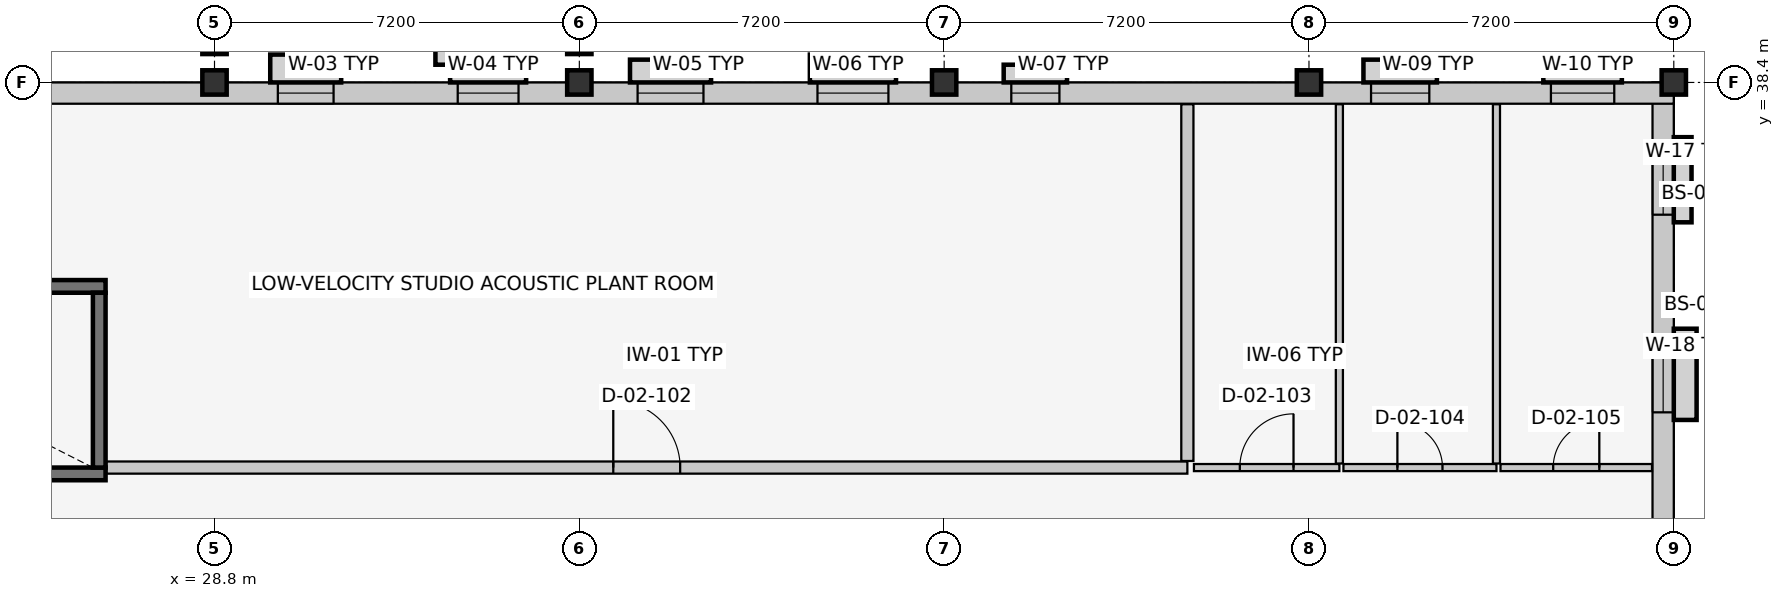
"""IFC4 building model, lengths in metres.
Left out: names, types, materials, properties, quantities, classifications, styles, units other than length and angle.
Written with IfcOpenShell. Run it as: python <this file> out.ifc"""

import sys

from ifc_helpers import new_model, si_unit, direction, frame, frame_2d, origin, origin_2d, place, context, subcontext, project, spatial, rectangle, extrude, element, fill, save


model = new_model("IFC4")
c1 = context("Model", 3, precision=1e-05, world=origin(), true_north=direction((0.0, 1.0)))
c2 = subcontext(c1, "Body", "Model", "MODEL_VIEW")
j1 = project(units=[si_unit("LENGTHUNIT", "METRE"), si_unit("PLANEANGLEUNIT", "RADIAN")], contexts=[c1])
p1 = place(None, origin())
s1 = spatial("IfcSite", under=j1, at=p1, CompositionType="ELEMENT")
p2 = place(p1, origin())
s2 = spatial("IfcBuilding", under=s1, at=p2, CompositionType="ELEMENT")
p3 = place(p2, frame((0.0, 0.0, 9.6)))
s3 = spatial("IfcBuildingStorey", under=s2, at=p3, CompositionType="ELEMENT", Elevation=9.6)
for number, where, z_axis, x_axis in (
    (1, (28.8, 38.4, 0.0), (0.0, 0.0, 1.0), (1.0, 0.0, 0.0)),
    (2, (36.0, 38.4, 0.0), (0.0, 0.0, 1.0), (1.0, 0.0, 0.0)),
    (3, (43.2, 38.4, 0.0), (0.0, 0.0, 1.0), (1.0, 0.0, 0.0)),
    (4, (50.4, 38.4, 0.0), (0.0, 0.0, 1.0), (1.0, 0.0, 0.0)),
    (5, (57.6, 38.4, 0.0), (0.0, 0.0, 1.0), (1.0, 0.0, 0.0)),
    (6, (28.8, 39.2, 0.0), (0.0, 0.0, 1.0), (1.0, 0.0, 0.0)),
    (7, (36.0, 39.2, 0.0), (0.0, 0.0, 1.0), (1.0, 0.0, 0.0)),
):
    element("IfcColumn", number, at=place(p3, frame(where, z_axis=z_axis, x_axis=x_axis)), inside=s3, PredefinedType="COLUMN", context=c2, shape_type="SweptSolid", body=[
        extrude(rectangle(XDim=0.48, YDim=0.48, at=origin_2d()), origin(), (0.0, 0.0, 1.0), 4.2),
    ])
p4 = place(p3, frame((57.39, 38.4, 0.0), z_axis=(0.0, 0.0, 1.0), x_axis=(0.0, -1.0, 0.0)))
e8 = element("IfcWall", 8, at=p4, inside=s3, PredefinedType="SOLIDWALL", context=c2, shape_type="SweptSolid", body=[
    extrude(rectangle(XDim=38.4, YDim=0.42, at=frame_2d((19.2, 0.0))), origin(), (0.0, 0.0, 1.0), 3.825),
])
p5 = place(p4, frame((1.23, 0.0, 0.9)))
e9 = element("IfcOpeningElement", 9, at=p5, cuts=e8, PredefinedType="OPENING", context=c2, shape_type="SweptSolid", body=[
    extrude(rectangle(XDim=1.38, YDim=1.6, at=frame_2d((0.69, 0.8))), frame((0.0, 0.222, 0.0), z_axis=(0.0, -1.0, 0.0), x_axis=(1.0, 0.0, 0.0)), (0.0, 0.0, 1.0), 0.444),
])
p6 = place(p4, frame((5.01, 0.0, 0.9)))
e10 = element("IfcOpeningElement", 10, at=p6, cuts=e8, PredefinedType="OPENING", context=c2, shape_type="SweptSolid", body=[
    extrude(rectangle(XDim=1.5, YDim=1.6, at=frame_2d((0.75, 0.8))), frame((0.0, 0.222, 0.0), z_axis=(0.0, -1.0, 0.0), x_axis=(1.0, 0.0, 0.0)), (0.0, 0.0, 1.0), 0.444),
])
p7 = place(p3, frame((0.0, 38.19, 0.0), z_axis=(0.0, 0.0, 1.0), x_axis=(1.0, 0.0, 0.0)))
e11 = element("IfcWall", 11, at=p7, inside=s3, PredefinedType="SOLIDWALL", context=c2, shape_type="SweptSolid", body=[
    extrude(rectangle(XDim=57.6, YDim=0.42, at=frame_2d((28.8, 0.0))), origin(), (0.0, 0.0, 1.0), 3.675),
])
p8 = place(p7, frame((1.3, 0.0, 0.9)))
e12 = element("IfcOpeningElement", 12, at=p8, cuts=e11, PredefinedType="OPENING", context=c2, shape_type="SweptSolid", body=[
    extrude(rectangle(XDim=1.0, YDim=1.75, at=frame_2d((0.5, 0.875))), frame((0.0, 0.222, 0.0), z_axis=(0.0, -1.0, 0.0), x_axis=(1.0, 0.0, 0.0)), (0.0, 0.0, 1.0), 0.444),
])
p9 = place(p7, frame((4.84, 0.0, 0.9)))
e13 = element("IfcOpeningElement", 13, at=p9, cuts=e11, PredefinedType="OPENING", context=c2, shape_type="SweptSolid", body=[
    extrude(rectangle(XDim=1.12, YDim=1.75, at=frame_2d((0.56, 0.875))), frame((0.0, 0.222, 0.0), z_axis=(0.0, -1.0, 0.0), x_axis=(1.0, 0.0, 0.0)), (0.0, 0.0, 1.0), 0.444),
])
p10 = place(p7, frame((8.38, 0.0, 0.9)))
e14 = element("IfcOpeningElement", 14, at=p10, cuts=e11, PredefinedType="OPENING", context=c2, shape_type="SweptSolid", body=[
    extrude(rectangle(XDim=1.24, YDim=1.75, at=frame_2d((0.62, 0.875))), frame((0.0, 0.222, 0.0), z_axis=(0.0, -1.0, 0.0), x_axis=(1.0, 0.0, 0.0)), (0.0, 0.0, 1.0), 0.444),
])
p11 = place(p7, frame((15.48, 0.0, 0.9)))
e15 = element("IfcOpeningElement", 15, at=p11, cuts=e11, PredefinedType="OPENING", context=c2, shape_type="SweptSolid", body=[
    extrude(rectangle(XDim=1.44, YDim=1.75, at=frame_2d((0.72, 0.875))), frame((0.0, 0.222, 0.0), z_axis=(0.0, -1.0, 0.0), x_axis=(1.0, 0.0, 0.0)), (0.0, 0.0, 1.0), 0.444),
])
p12 = place(p7, frame((19.05, 0.0, 0.9)))
e16 = element("IfcOpeningElement", 16, at=p12, cuts=e11, PredefinedType="OPENING", context=c2, shape_type="SweptSolid", body=[
    extrude(rectangle(XDim=1.5, YDim=1.75, at=frame_2d((0.75, 0.875))), frame((0.0, 0.222, 0.0), z_axis=(0.0, -1.0, 0.0), x_axis=(1.0, 0.0, 0.0)), (0.0, 0.0, 1.0), 0.444),
])
p13 = place(p7, frame((22.95, 0.0, 0.9)))
e17 = element("IfcOpeningElement", 17, at=p13, cuts=e11, PredefinedType="OPENING", context=c2, shape_type="SweptSolid", body=[
    extrude(rectangle(XDim=0.9, YDim=1.35, at=frame_2d((0.45, 0.675))), frame((0.0, 0.222, 0.0), z_axis=(0.0, -1.0, 0.0), x_axis=(1.0, 0.0, 0.0)), (0.0, 0.0, 1.0), 0.444),
])
p14 = place(p7, frame((30.05, 0.0, 0.9)))
e18 = element("IfcOpeningElement", 18, at=p14, cuts=e11, PredefinedType="OPENING", context=c2, shape_type="SweptSolid", body=[
    extrude(rectangle(XDim=1.1, YDim=1.35, at=frame_2d((0.55, 0.675))), frame((0.0, 0.222, 0.0), z_axis=(0.0, -1.0, 0.0), x_axis=(1.0, 0.0, 0.0)), (0.0, 0.0, 1.0), 0.444),
])
p15 = place(p7, frame((33.6, 0.0, 0.9)))
e19 = element("IfcOpeningElement", 19, at=p15, cuts=e11, PredefinedType="OPENING", context=c2, shape_type="SweptSolid", body=[
    extrude(rectangle(XDim=1.2, YDim=1.35, at=frame_2d((0.6, 0.675))), frame((0.0, 0.222, 0.0), z_axis=(0.0, -1.0, 0.0), x_axis=(1.0, 0.0, 0.0)), (0.0, 0.0, 1.0), 0.444),
])
p16 = place(p7, frame((37.15, 0.0, 0.9)))
e20 = element("IfcOpeningElement", 20, at=p16, cuts=e11, PredefinedType="OPENING", context=c2, shape_type="SweptSolid", body=[
    extrude(rectangle(XDim=1.3, YDim=1.35, at=frame_2d((0.65, 0.675))), frame((0.0, 0.222, 0.0), z_axis=(0.0, -1.0, 0.0), x_axis=(1.0, 0.0, 0.0)), (0.0, 0.0, 1.0), 0.444),
])
p17 = place(p7, frame((40.7, 0.0, 0.9)))
e21 = element("IfcOpeningElement", 21, at=p17, cuts=e11, PredefinedType="OPENING", context=c2, shape_type="SweptSolid", body=[
    extrude(rectangle(XDim=1.4, YDim=1.35, at=frame_2d((0.7, 0.675))), frame((0.0, 0.222, 0.0), z_axis=(0.0, -1.0, 0.0), x_axis=(1.0, 0.0, 0.0)), (0.0, 0.0, 1.0), 0.444),
])
p18 = place(p7, frame((44.525, 0.0, 0.9)))
e22 = element("IfcOpeningElement", 22, at=p18, cuts=e11, PredefinedType="OPENING", context=c2, shape_type="SweptSolid", body=[
    extrude(rectangle(XDim=0.95, YDim=1.45, at=frame_2d((0.475, 0.725))), frame((0.0, 0.222, 0.0), z_axis=(0.0, -1.0, 0.0), x_axis=(1.0, 0.0, 0.0)), (0.0, 0.0, 1.0), 0.444),
])
p19 = place(p7, frame((51.625, 0.0, 0.9)))
e23 = element("IfcOpeningElement", 23, at=p19, cuts=e11, PredefinedType="OPENING", context=c2, shape_type="SweptSolid", body=[
    extrude(rectangle(XDim=1.15, YDim=1.45, at=frame_2d((0.575, 0.725))), frame((0.0, 0.222, 0.0), z_axis=(0.0, -1.0, 0.0), x_axis=(1.0, 0.0, 0.0)), (0.0, 0.0, 1.0), 0.444),
])
p20 = place(p7, frame((55.175, 0.0, 0.9)))
e24 = element("IfcOpeningElement", 24, at=p20, cuts=e11, PredefinedType="OPENING", context=c2, shape_type="SweptSolid", body=[
    extrude(rectangle(XDim=1.25, YDim=1.45, at=frame_2d((0.625, 0.725))), frame((0.0, 0.222, 0.0), z_axis=(0.0, -1.0, 0.0), x_axis=(1.0, 0.0, 0.0)), (0.0, 0.0, 1.0), 0.444),
])
for number, where, z_axis, x_axis in (
    (25, (17.75, 30.675, 0.0), (0.0, 0.0, 1.0), (1.0, 0.0, 0.0)),
    (26, (26.65, 34.375, 0.0), (0.0, 0.0, 1.0), (-1.0, 0.0, 0.0)),
):
    element("IfcWall", number, at=place(p3, frame(where, z_axis=z_axis, x_axis=x_axis)), inside=s3, PredefinedType="SHEAR", context=c2, shape_type="SweptSolid", body=[
        extrude(rectangle(XDim=8.9, YDim=0.25, at=frame_2d((4.45, 0.0))), origin(), (0.0, 0.0, 1.0), 3.95),
    ])
p21 = place(p3, frame((26.525, 30.8, 0.0), z_axis=(0.0, 0.0, 1.0), x_axis=(0.0, 1.0, 0.0)))
e27 = element("IfcWall", 27, at=p21, inside=s3, PredefinedType="SHEAR", context=c2, shape_type="SweptSolid", body=[
    extrude(rectangle(XDim=3.45, YDim=0.25, at=frame_2d((1.725, 0.0))), origin(), (0.0, 0.0, 1.0), 3.95),
])
p22 = place(p3, frame((26.66, 30.8, 0.0), z_axis=(0.0, 0.0, 1.0), x_axis=(1.0, 0.0, 0.0)))
e28 = element("IfcWall", 28, at=p22, inside=s3, PredefinedType="PARTITIONING", context=c2, shape_type="SweptSolid", body=[
    extrude(rectangle(XDim=21.34, YDim=0.24, at=frame_2d((10.67, 0.0))), origin(), (0.0, 0.0, 1.0), 3.95),
])
p23 = place(p22, frame((10.01, 0.0, 0.0)))
e29 = element("IfcOpeningElement", 29, at=p23, cuts=e28, PredefinedType="OPENING", context=c2, shape_type="SweptSolid", body=[
    extrude(rectangle(XDim=1.32, YDim=2.15, at=frame_2d((0.66, 1.075))), frame((0.0, 0.132, 0.0), z_axis=(0.0, -1.0, 0.0), x_axis=(1.0, 0.0, 0.0)), (0.0, 0.0, 1.0), 0.264),
])
p24 = place(p3, frame((48.0, 30.93, 0.0), z_axis=(0.0, 0.0, 1.0), x_axis=(0.0, 1.0, 0.0)))
e30 = element("IfcWall", 30, at=p24, inside=s3, PredefinedType="PARTITIONING", context=c2, shape_type="SweptSolid", body=[
    extrude(rectangle(XDim=7.04, YDim=0.24, at=frame_2d((3.52, 0.0))), origin(), (0.0, 0.0, 1.0), 3.775),
])
p25 = place(p3, frame((48.13, 30.8, 0.0), z_axis=(0.0, 0.0, 1.0), x_axis=(1.0, 0.0, 0.0)))
e31 = element("IfcWall", 31, at=p25, inside=s3, PredefinedType="PARTITIONING", context=c2, shape_type="SweptSolid", body=[
    extrude(rectangle(XDim=2.87, YDim=0.14, at=frame_2d((1.435, 0.0))), origin(), (0.0, 0.0, 1.0), 3.95),
])
p26 = place(p25, frame((0.905, 0.0, 0.0)))
e32 = element("IfcOpeningElement", 32, at=p26, cuts=e31, PredefinedType="OPENING", context=c2, shape_type="SweptSolid", body=[
    extrude(rectangle(XDim=1.06, YDim=2.1, at=frame_2d((0.53, 1.05))), frame((0.0, 0.082, 0.0), z_axis=(0.0, -1.0, 0.0), x_axis=(1.0, 0.0, 0.0)), (0.0, 0.0, 1.0), 0.164),
])
p27 = place(p3, frame((51.0, 30.88, 0.0), z_axis=(0.0, 0.0, 1.0), x_axis=(0.0, 1.0, 0.0)))
e33 = element("IfcWall", 33, at=p27, inside=s3, PredefinedType="PARTITIONING", context=c2, shape_type="SweptSolid", body=[
    extrude(rectangle(XDim=7.09, YDim=0.14, at=frame_2d((3.545, 0.0))), origin(), (0.0, 0.0, 1.0), 3.95),
])
p28 = place(p3, frame((51.08, 30.8, 0.0), z_axis=(0.0, 0.0, 1.0), x_axis=(1.0, 0.0, 0.0)))
e34 = element("IfcWall", 34, at=p28, inside=s3, PredefinedType="PARTITIONING", context=c2, shape_type="SweptSolid", body=[
    extrude(rectangle(XDim=3.02, YDim=0.14, at=frame_2d((1.51, 0.0))), origin(), (0.0, 0.0, 1.0), 3.95),
])
p29 = place(p28, frame((1.065, 0.0, 0.0)))
e35 = element("IfcOpeningElement", 35, at=p29, cuts=e34, PredefinedType="OPENING", context=c2, shape_type="SweptSolid", body=[
    extrude(rectangle(XDim=0.89, YDim=2.05, at=frame_2d((0.445, 1.025))), frame((0.0, 0.082, 0.0), z_axis=(0.0, -1.0, 0.0), x_axis=(1.0, 0.0, 0.0)), (0.0, 0.0, 1.0), 0.164),
])
p30 = place(p3, frame((54.1, 30.88, 0.0), z_axis=(0.0, 0.0, 1.0), x_axis=(0.0, 1.0, 0.0)))
e36 = element("IfcWall", 36, at=p30, inside=s3, PredefinedType="PARTITIONING", context=c2, shape_type="SweptSolid", body=[
    extrude(rectangle(XDim=7.09, YDim=0.14, at=frame_2d((3.545, 0.0))), origin(), (0.0, 0.0, 1.0), 3.95),
])
p31 = place(p3, frame((54.18, 30.8, 0.0), z_axis=(0.0, 0.0, 1.0), x_axis=(1.0, 0.0, 0.0)))
e37 = element("IfcWall", 37, at=p31, inside=s3, PredefinedType="PARTITIONING", context=c2, shape_type="SweptSolid", body=[
    extrude(rectangle(XDim=2.99, YDim=0.14, at=frame_2d((1.495, 0.0))), origin(), (0.0, 0.0, 1.0), 3.95),
])
p32 = place(p31, frame((1.04, 0.0, 0.0)))
e38 = element("IfcOpeningElement", 38, at=p32, cuts=e37, PredefinedType="OPENING", context=c2, shape_type="SweptSolid", body=[
    extrude(rectangle(XDim=0.91, YDim=2.06, at=frame_2d((0.455, 1.03))), frame((0.0, 0.082, 0.0), z_axis=(0.0, -1.0, 0.0), x_axis=(1.0, 0.0, 0.0)), (0.0, 0.0, 1.0), 0.164),
])
p33 = place(p5, origin())
e39 = element("IfcWindow", 39, at=p33, inside=s3, PartitioningType="SINGLE_PANEL", PredefinedType="WINDOW", context=c2, shape_type="SweptSolid", body=[
    extrude(rectangle(XDim=1.38, YDim=1.6, at=frame_2d((0.69, 0.8))), frame((0.0, 0.03, 0.0), z_axis=(0.0, -1.0, 0.0), x_axis=(1.0, 0.0, 0.0)), (0.0, 0.0, 1.0), 0.06),
])
fill(e9, e39)
p34 = place(p6, origin())
e40 = element("IfcWindow", 40, at=p34, inside=s3, PartitioningType="SINGLE_PANEL", PredefinedType="WINDOW", context=c2, shape_type="SweptSolid", body=[
    extrude(rectangle(XDim=1.5, YDim=1.6, at=frame_2d((0.75, 0.8))), frame((0.0, 0.03, 0.0), z_axis=(0.0, -1.0, 0.0), x_axis=(1.0, 0.0, 0.0)), (0.0, 0.0, 1.0), 0.06),
])
fill(e10, e40)
p35 = place(p14, origin())
e41 = element("IfcWindow", 41, at=p35, inside=s3, PartitioningType="SINGLE_PANEL", PredefinedType="WINDOW", context=c2, shape_type="SweptSolid", body=[
    extrude(rectangle(XDim=1.1, YDim=1.35, at=frame_2d((0.55, 0.675))), frame((0.0, 0.03, 0.0), z_axis=(0.0, -1.0, 0.0), x_axis=(1.0, 0.0, 0.0)), (0.0, 0.0, 1.0), 0.06),
])
fill(e18, e41)
p36 = place(p15, origin())
e42 = element("IfcWindow", 42, at=p36, inside=s3, PartitioningType="SINGLE_PANEL", PredefinedType="WINDOW", context=c2, shape_type="SweptSolid", body=[
    extrude(rectangle(XDim=1.2, YDim=1.35, at=frame_2d((0.6, 0.675))), frame((0.0, 0.03, 0.0), z_axis=(0.0, -1.0, 0.0), x_axis=(1.0, 0.0, 0.0)), (0.0, 0.0, 1.0), 0.06),
])
fill(e19, e42)
p37 = place(p16, origin())
e43 = element("IfcWindow", 43, at=p37, inside=s3, PartitioningType="SINGLE_PANEL", PredefinedType="WINDOW", context=c2, shape_type="SweptSolid", body=[
    extrude(rectangle(XDim=1.3, YDim=1.35, at=frame_2d((0.65, 0.675))), frame((0.0, 0.03, 0.0), z_axis=(0.0, -1.0, 0.0), x_axis=(1.0, 0.0, 0.0)), (0.0, 0.0, 1.0), 0.06),
])
fill(e20, e43)
p38 = place(p17, origin())
e44 = element("IfcWindow", 44, at=p38, inside=s3, PartitioningType="SINGLE_PANEL", PredefinedType="WINDOW", context=c2, shape_type="SweptSolid", body=[
    extrude(rectangle(XDim=1.4, YDim=1.35, at=frame_2d((0.7, 0.675))), frame((0.0, 0.03, 0.0), z_axis=(0.0, -1.0, 0.0), x_axis=(1.0, 0.0, 0.0)), (0.0, 0.0, 1.0), 0.06),
])
fill(e21, e44)
p39 = place(p18, origin())
e45 = element("IfcWindow", 45, at=p39, inside=s3, PartitioningType="SINGLE_PANEL", PredefinedType="WINDOW", context=c2, shape_type="SweptSolid", body=[
    extrude(rectangle(XDim=0.95, YDim=1.45, at=frame_2d((0.475, 0.725))), frame((0.0, 0.03, 0.0), z_axis=(0.0, -1.0, 0.0), x_axis=(1.0, 0.0, 0.0)), (0.0, 0.0, 1.0), 0.06),
])
fill(e22, e45)
p40 = place(p19, origin())
e46 = element("IfcWindow", 46, at=p40, inside=s3, PartitioningType="SINGLE_PANEL", PredefinedType="WINDOW", context=c2, shape_type="SweptSolid", body=[
    extrude(rectangle(XDim=1.15, YDim=1.45, at=frame_2d((0.575, 0.725))), frame((0.0, 0.03, 0.0), z_axis=(0.0, -1.0, 0.0), x_axis=(1.0, 0.0, 0.0)), (0.0, 0.0, 1.0), 0.06),
])
fill(e23, e46)
p41 = place(p20, origin())
e47 = element("IfcWindow", 47, at=p41, inside=s3, PartitioningType="SINGLE_PANEL", PredefinedType="WINDOW", context=c2, shape_type="SweptSolid", body=[
    extrude(rectangle(XDim=1.25, YDim=1.45, at=frame_2d((0.625, 0.725))), frame((0.0, 0.03, 0.0), z_axis=(0.0, -1.0, 0.0), x_axis=(1.0, 0.0, 0.0)), (0.0, 0.0, 1.0), 0.06),
])
fill(e24, e47)
p42 = place(p23, origin())
e48 = element("IfcDoor", 48, at=p42, inside=s3, OperationType="SINGLE_SWING_LEFT", PredefinedType="DOOR", context=c2, shape_type="SweptSolid", body=[
    extrude(rectangle(XDim=1.32, YDim=2.15, at=frame_2d((0.66, 1.075))), frame((0.0, 0.025, 0.0), z_axis=(0.0, -1.0, 0.0), x_axis=(1.0, 0.0, 0.0)), (0.0, 0.0, 1.0), 0.05),
])
fill(e29, e48)
p43 = place(p26, origin())
e49 = element("IfcDoor", 49, at=p43, inside=s3, OperationType="SINGLE_SWING_RIGHT", PredefinedType="DOOR", context=c2, shape_type="SweptSolid", body=[
    extrude(rectangle(XDim=1.06, YDim=2.1, at=frame_2d((0.53, 1.05))), frame((0.0, 0.025, 0.0), z_axis=(0.0, -1.0, 0.0), x_axis=(1.0, 0.0, 0.0)), (0.0, 0.0, 1.0), 0.05),
])
fill(e32, e49)
p44 = place(p29, origin())
e50 = element("IfcDoor", 50, at=p44, inside=s3, OperationType="SINGLE_SWING_LEFT", PredefinedType="DOOR", context=c2, shape_type="SweptSolid", body=[
    extrude(rectangle(XDim=0.89, YDim=2.05, at=frame_2d((0.445, 1.025))), frame((0.0, 0.025, 0.0), z_axis=(0.0, -1.0, 0.0), x_axis=(1.0, 0.0, 0.0)), (0.0, 0.0, 1.0), 0.05),
])
fill(e35, e50)
p45 = place(p32, origin())
e51 = element("IfcDoor", 51, at=p45, inside=s3, OperationType="SINGLE_SWING_RIGHT", PredefinedType="DOOR", context=c2, shape_type="SweptSolid", body=[
    extrude(rectangle(XDim=0.91, YDim=2.06, at=frame_2d((0.455, 1.03))), frame((0.0, 0.025, 0.0), z_axis=(0.0, -1.0, 0.0), x_axis=(1.0, 0.0, 0.0)), (0.0, 0.0, 1.0), 0.05),
])
fill(e38, e51)
save(model, sys.argv[1])
